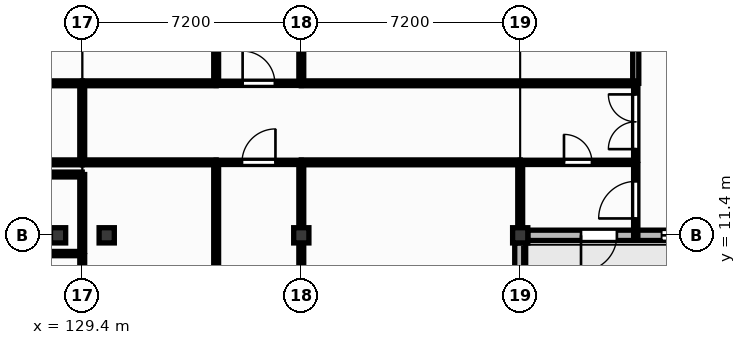
"""IFC4 building model, lengths in metres.
Left out: names, types, materials, properties, quantities, classifications, styles, units other than length and angle.
Written with IfcOpenShell. Run it as: python <this file> out.ifc"""

import sys

from ifc_helpers import new_model, si_unit, direction, frame, frame_2d, origin, origin_2d, place, context, subcontext, project, spatial, rectangle, extrude, element, fill, save


model = new_model("IFC4")
c1 = context("Model", 3, precision=1e-05, world=origin(), true_north=direction((0.0, 1.0)))
c2 = subcontext(c1, "Body", "Model", "MODEL_VIEW")
j1 = project(units=[si_unit("LENGTHUNIT", "METRE"), si_unit("PLANEANGLEUNIT", "RADIAN")], contexts=[c1])
p1 = place(None, origin())
s1 = spatial("IfcSite", under=j1, at=p1, CompositionType="ELEMENT")
p2 = place(p1, origin())
s2 = spatial("IfcBuilding", under=s1, at=p2, CompositionType="ELEMENT")
p3 = place(p2, frame((0.0, 0.0, 4.5)))
s3 = spatial("IfcBuildingStorey", under=s2, at=p3, CompositionType="ELEMENT", Elevation=4.5)
for number, where, z_axis, x_axis in (
    (1, (128.6, 11.4, 0.0), (0.0, 0.0, 1.0), (1.0, 0.0, 0.0)),
    (2, (130.2, 11.4, 0.0), (0.0, 0.0, 1.0), (1.0, 0.0, 0.0)),
    (3, (136.6, 11.4, 0.0), (0.0, 0.0, 1.0), (1.0, 0.0, 0.0)),
    (4, (143.8, 11.4, 0.0), (0.0, 0.0, 1.0), (1.0, 0.0, 0.0)),
):
    element("IfcColumn", number, at=place(p3, frame(where, z_axis=z_axis, x_axis=x_axis)), inside=s3, PredefinedType="COLUMN", context=c2, shape_type="SweptSolid", body=[
        extrude(rectangle(XDim=0.5, YDim=0.5, at=origin_2d()), origin(), (0.0, 0.0, 1.0), 4.22),
    ])
p4 = place(p3, frame((143.8, 4.45, 0.0), z_axis=(0.0, 0.0, 1.0), x_axis=(0.0, 1.0, 0.0)))
e5 = element("IfcWall", 5, at=p4, inside=s3, PredefinedType="SOLIDWALL", context=c2, shape_type="SweptSolid", body=[
    extrude(rectangle(XDim=6.7, YDim=0.36, at=frame_2d((3.35, 0.0))), origin(), (0.0, 0.0, 1.0), 3.52),
])
p5 = place(p4, frame((0.665, 0.0, 1.05)))
e6 = element("IfcOpeningElement", 6, at=p5, cuts=e5, PredefinedType="OPENING", context=c2, shape_type="SweptSolid", body=[
    extrude(rectangle(XDim=1.54, YDim=1.65, at=frame_2d((0.77, 0.825))), frame((0.0, 0.19, 0.0), z_axis=(0.0, -1.0, 0.0), x_axis=(1.0, 0.0, 0.0)), (0.0, 0.0, 1.0), 0.38),
])
p6 = place(p4, frame((3.475, 0.0, 1.5)))
e7 = element("IfcOpeningElement", 7, at=p6, cuts=e5, PredefinedType="OPENING", context=c2, shape_type="SweptSolid", body=[
    extrude(rectangle(XDim=1.15, YDim=1.25, at=frame_2d((0.575, 0.625))), frame((0.0, 0.19, 0.0), z_axis=(0.0, -1.0, 0.0), x_axis=(1.0, 0.0, 0.0)), (0.0, 0.0, 1.0), 0.38),
])
p7 = place(p3, frame((144.05, 11.4, 0.0), z_axis=(0.0, 0.0, 1.0), x_axis=(1.0, 0.0, 0.0)))
e8 = element("IfcWall", 8, at=p7, inside=s3, PredefinedType="SOLIDWALL", context=c2, shape_type="SweptSolid", body=[
    extrude(rectangle(XDim=6.77, YDim=0.34, at=frame_2d((3.385, 0.0))), origin(), (0.0, 0.0, 1.0), 3.76),
])
p8 = place(p7, frame((1.75, 0.0, 0.0)))
e9 = element("IfcOpeningElement", 9, at=p8, cuts=e8, PredefinedType="OPENING", context=c2, shape_type="SweptSolid", body=[
    extrude(rectangle(XDim=1.18, YDim=2.2, at=frame_2d((0.59, 1.1))), frame((0.0, 0.18, 0.0), z_axis=(0.0, -1.0, 0.0), x_axis=(1.0, 0.0, 0.0)), (0.0, 0.0, 1.0), 0.36),
])
p9 = place(p7, frame((4.4, 0.0, 1.05)))
e10 = element("IfcOpeningElement", 10, at=p9, cuts=e8, PredefinedType="OPENING", context=c2, shape_type="SweptSolid", body=[
    extrude(rectangle(XDim=1.4, YDim=1.65, at=frame_2d((0.7, 0.825))), frame((0.0, 0.18, 0.0), z_axis=(0.0, -1.0, 0.0), x_axis=(1.0, 0.0, 0.0)), (0.0, 0.0, 1.0), 0.36),
])
p10 = place(p3, frame((124.6, 10.8, 0.0), z_axis=(0.0, 0.0, 1.0), x_axis=(1.0, 0.0, 0.0)))
e11 = element("IfcWall", 11, at=p10, inside=s3, PredefinedType="PARTITIONING", context=c2, shape_type="SweptSolid", body=[
    extrude(rectangle(XDim=4.795, YDim=0.14, at=frame_2d((2.397, 0.0))), origin(), (0.0, 0.0, 1.0), 4.18),
])
p11 = place(p3, frame((133.8, 13.8, 0.0), z_axis=(0.0, 0.0, 1.0), x_axis=(1.0, 0.0, 0.0)))
e12 = element("IfcWall", 12, at=p11, inside=s3, PredefinedType="PARTITIONING", context=c2, shape_type="SweptSolid", body=[
    extrude(rectangle(XDim=2.8, YDim=0.14, at=frame_2d((1.4, 0.0))), origin(), (0.0, 0.0, 1.0), 4.18),
])
p12 = place(p11, frame((0.85, 0.0, 0.0)))
e13 = element("IfcOpeningElement", 13, at=p12, cuts=e12, PredefinedType="OPENING", context=c2, shape_type="SweptSolid", body=[
    extrude(rectangle(XDim=1.1, YDim=2.1, at=frame_2d((0.55, 1.05))), frame((0.0, 0.08, 0.0), z_axis=(0.0, -1.0, 0.0), x_axis=(1.0, 0.0, 0.0)), (0.0, 0.0, 1.0), 0.16),
])
p13 = place(p3, frame((133.8, 16.4, 0.0), z_axis=(0.0, 0.0, 1.0), x_axis=(1.0, 0.0, 0.0)))
e14 = element("IfcWall", 14, at=p13, inside=s3, PredefinedType="PARTITIONING", context=c2, shape_type="SweptSolid", body=[
    extrude(rectangle(XDim=2.8, YDim=0.14, at=frame_2d((1.4, 0.0))), origin(), (0.0, 0.0, 1.0), 4.18),
])
p14 = place(p13, frame((0.87, 0.0, 0.0)))
e15 = element("IfcOpeningElement", 15, at=p14, cuts=e14, PredefinedType="OPENING", context=c2, shape_type="SweptSolid", body=[
    extrude(rectangle(XDim=1.06, YDim=2.15, at=frame_2d((0.53, 1.075))), frame((0.0, 0.08, 0.0), z_axis=(0.0, -1.0, 0.0), x_axis=(1.0, 0.0, 0.0)), (0.0, 0.0, 1.0), 0.16),
])
p15 = place(p3, frame((143.8, 13.8, 0.0), z_axis=(0.0, 0.0, 1.0), x_axis=(1.0, 0.0, 0.0)))
e16 = element("IfcWall", 16, at=p15, inside=s3, PredefinedType="PARTITIONING", context=c2, shape_type="SweptSolid", body=[
    extrude(rectangle(XDim=3.8, YDim=0.14, at=frame_2d((1.9, 0.0))), origin(), (0.0, 0.0, 1.0), 4.18),
])
p16 = place(p15, frame((1.44, 0.0, 0.0)))
e17 = element("IfcOpeningElement", 17, at=p16, cuts=e16, PredefinedType="OPENING", context=c2, shape_type="SweptSolid", body=[
    extrude(rectangle(XDim=0.92, YDim=2.1, at=frame_2d((0.46, 1.05))), frame((0.0, 0.08, 0.0), z_axis=(0.0, -1.0, 0.0), x_axis=(1.0, 0.0, 0.0)), (0.0, 0.0, 1.0), 0.16),
])
p17 = place(p3, frame((147.6, 11.4, 0.0), z_axis=(0.0, 0.0, 1.0), x_axis=(0.0, 1.0, 0.0)))
e18 = element("IfcWall", 18, at=p17, inside=s3, PredefinedType="PARTITIONING", context=c2, shape_type="SweptSolid", body=[
    extrude(rectangle(XDim=2.33, YDim=0.14, at=frame_2d((1.165, 0.0))), origin(), (0.0, 0.0, 1.0), 4.18),
])
p18 = place(p17, frame((0.555, 0.0, 0.0)))
e19 = element("IfcOpeningElement", 19, at=p18, cuts=e18, PredefinedType="OPENING", context=c2, shape_type="SweptSolid", body=[
    extrude(rectangle(XDim=1.22, YDim=2.1, at=frame_2d((0.61, 1.05))), frame((0.0, 0.08, 0.0), z_axis=(0.0, -1.0, 0.0), x_axis=(1.0, 0.0, 0.0)), (0.0, 0.0, 1.0), 0.16),
])
p19 = place(p3, frame((147.6, 13.87, 0.0), z_axis=(0.0, 0.0, 1.0), x_axis=(0.0, 1.0, 0.0)))
e20 = element("IfcWall", 20, at=p19, inside=s3, PredefinedType="PARTITIONING", context=c2, shape_type="SweptSolid", body=[
    extrude(rectangle(XDim=2.53, YDim=0.14, at=frame_2d((1.265, 0.0))), origin(), (0.0, 0.0, 1.0), 4.18),
])
p20 = place(p19, frame((0.365, 0.0, 0.0)))
e21 = element("IfcOpeningElement", 21, at=p20, cuts=e20, PredefinedType="OPENING", context=c2, shape_type="SweptSolid", body=[
    extrude(rectangle(XDim=1.8, YDim=2.3, at=frame_2d((0.9, 1.15))), frame((0.0, 0.08, 0.0), z_axis=(0.0, -1.0, 0.0), x_axis=(1.0, 0.0, 0.0)), (0.0, 0.0, 1.0), 0.16),
])
p21 = place(p3, frame((147.6, 16.4, 0.0), z_axis=(0.0, 0.0, 1.0), x_axis=(0.0, 1.0, 0.0)))
e22 = element("IfcWall", 22, at=p21, inside=s3, PredefinedType="PARTITIONING", context=c2, shape_type="SweptSolid", body=[
    extrude(rectangle(XDim=2.2, YDim=0.2, at=frame_2d((1.1, 0.0))), origin(), (0.0, 0.0, 1.0), 4.18),
])
p22 = place(p3, frame((129.395, 10.87, 0.0), z_axis=(0.0, 0.0, 1.0), x_axis=(0.0, 1.0, 0.0)))
e23 = element("IfcWall", 23, at=p22, inside=s3, PredefinedType="PARTITIONING", context=c2, shape_type="SweptSolid", body=[
    extrude(rectangle(XDim=2.53, YDim=0.16, at=frame_2d((1.265, 0.0))), origin(), (0.0, 0.0, 1.0), 4.18),
])
for number, where, z_axis, x_axis in (
    (24, (129.395, 13.4, 0.0), (0.0, 0.0, 1.0), (-1.0, 0.0, 0.0)),
    (25, (124.6, 13.8, 0.0), (0.0, 0.0, 1.0), (1.0, 0.0, 0.0)),
):
    element("IfcWall", number, at=place(p3, frame(where, z_axis=z_axis, x_axis=x_axis)), inside=s3, PredefinedType="PARTITIONING", context=c2, shape_type="SweptSolid", body=[
        extrude(rectangle(XDim=4.795, YDim=0.16, at=frame_2d((2.397, 0.0))), origin(), (0.0, 0.0, 1.0), 4.18),
    ])
p23 = place(p3, frame((129.395, 13.8, 0.0), z_axis=(0.0, 0.0, 1.0), x_axis=(0.0, 1.0, 0.0)))
e26 = element("IfcWall", 26, at=p23, inside=s3, PredefinedType="PARTITIONING", context=c2, shape_type="SweptSolid", body=[
    extrude(rectangle(XDim=2.6, YDim=0.16, at=frame_2d((1.3, 0.0))), origin(), (0.0, 0.0, 1.0), 4.18),
])
p24 = place(p3, frame((129.395, 16.4, 0.0), z_axis=(0.0, 0.0, 1.0), x_axis=(-1.0, 0.0, 0.0)))
e27 = element("IfcWall", 27, at=p24, inside=s3, PredefinedType="PARTITIONING", context=c2, shape_type="SweptSolid", body=[
    extrude(rectangle(XDim=4.795, YDim=0.16, at=frame_2d((2.397, 0.0))), origin(), (0.0, 0.0, 1.0), 4.18),
])
p25 = place(p3, frame((129.405, 13.8, 0.0), z_axis=(0.0, 0.0, 1.0), x_axis=(1.0, 0.0, 0.0)))
e28 = element("IfcWall", 28, at=p25, inside=s3, PredefinedType="PARTITIONING", context=c2, shape_type="SweptSolid", body=[
    extrude(rectangle(XDim=4.395, YDim=0.16, at=frame_2d((2.198, 0.0))), origin(), (0.0, 0.0, 1.0), 4.18),
])
p26 = place(p3, frame((136.6, 13.8, 0.0), z_axis=(0.0, 0.0, 1.0), x_axis=(1.0, 0.0, 0.0)))
e29 = element("IfcWall", 29, at=p26, inside=s3, PredefinedType="PARTITIONING", context=c2, shape_type="SweptSolid", body=[
    extrude(rectangle(XDim=7.2, YDim=0.16, at=frame_2d((3.6, 0.0))), origin(), (0.0, 0.0, 1.0), 4.18),
])
p27 = place(p3, frame((147.6, 16.4, 0.0), z_axis=(0.0, 0.0, 1.0), x_axis=(-1.0, 0.0, 0.0)))
e30 = element("IfcWall", 30, at=p27, inside=s3, PredefinedType="PARTITIONING", context=c2, shape_type="SweptSolid", body=[
    extrude(rectangle(XDim=11.0, YDim=0.16, at=frame_2d((5.5, 0.0))), origin(), (0.0, 0.0, 1.0), 4.18),
])
p28 = place(p3, frame((133.8, 16.4, 0.0), z_axis=(0.0, 0.0, 1.0), x_axis=(-1.0, 0.0, 0.0)))
e31 = element("IfcWall", 31, at=p28, inside=s3, PredefinedType="PARTITIONING", context=c2, shape_type="SweptSolid", body=[
    extrude(rectangle(XDim=4.395, YDim=0.16, at=frame_2d((2.198, 0.0))), origin(), (0.0, 0.0, 1.0), 4.18),
])
p29 = place(p3, frame((143.8, 11.65, 0.0), z_axis=(0.0, 0.0, 1.0), x_axis=(0.0, 1.0, 0.0)))
e32 = element("IfcWall", 32, at=p29, inside=s3, PredefinedType="PARTITIONING", context=c2, shape_type="SweptSolid", body=[
    extrude(rectangle(XDim=2.08, YDim=0.16, at=frame_2d((1.04, 0.0))), origin(), (0.0, 0.0, 1.0), 3.52),
])
p30 = place(p3, frame((136.6, 9.8, 0.0), z_axis=(0.0, 0.0, 1.0), x_axis=(0.0, 1.0, 0.0)))
e33 = element("IfcWall", 33, at=p30, inside=s3, PredefinedType="PARTITIONING", context=c2, shape_type="SweptSolid", body=[
    extrude(rectangle(XDim=1.35, YDim=0.16, at=frame_2d((0.675, 0.0))), origin(), (0.0, 0.0, 1.0), 3.52),
])
p31 = place(p3, frame((136.6, 11.65, 0.0), z_axis=(0.0, 0.0, 1.0), x_axis=(0.0, 1.0, 0.0)))
e34 = element("IfcWall", 34, at=p31, inside=s3, PredefinedType="PARTITIONING", context=c2, shape_type="SweptSolid", body=[
    extrude(rectangle(XDim=2.08, YDim=0.16, at=frame_2d((1.04, 0.0))), origin(), (0.0, 0.0, 1.0), 3.52),
])
p32 = place(p3, frame((133.8, 9.8, 0.0), z_axis=(0.0, 0.0, 1.0), x_axis=(0.0, 1.0, 0.0)))
e35 = element("IfcWall", 35, at=p32, inside=s3, PredefinedType="PARTITIONING", context=c2, shape_type="SweptSolid", body=[
    extrude(rectangle(XDim=3.93, YDim=0.16, at=frame_2d((1.965, 0.0))), origin(), (0.0, 0.0, 1.0), 4.18),
])
p33 = place(p3, frame((136.6, 16.47, 0.0), z_axis=(0.0, 0.0, 1.0), x_axis=(0.0, 1.0, 0.0)))
e36 = element("IfcWall", 36, at=p33, inside=s3, PredefinedType="PARTITIONING", context=c2, shape_type="SweptSolid", body=[
    extrude(rectangle(XDim=1.88, YDim=0.16, at=frame_2d((0.94, 0.0))), origin(), (0.0, 0.0, 1.0), 3.52),
])
p34 = place(p3, frame((133.8, 16.47, 0.0), z_axis=(0.0, 0.0, 1.0), x_axis=(0.0, 1.0, 0.0)))
e37 = element("IfcWall", 37, at=p34, inside=s3, PredefinedType="PARTITIONING", context=c2, shape_type="SweptSolid", body=[
    extrude(rectangle(XDim=2.13, YDim=0.16, at=frame_2d((1.065, 0.0))), origin(), (0.0, 0.0, 1.0), 4.18),
])
p35 = place(p3, frame((129.395, 9.8, 0.0), z_axis=(0.0, 0.0, 1.0), x_axis=(0.0, 1.0, 0.0)))
e38 = element("IfcWall", 38, at=p35, inside=s3, PredefinedType="PARTITIONING", context=c2, shape_type="SweptSolid", body=[
    extrude(rectangle(XDim=0.93, YDim=0.16, at=frame_2d((0.465, 0.0))), origin(), (0.0, 0.0, 1.0), 4.18),
])
p36 = place(p8, frame((1.18, 0.0, 0.0), z_axis=(0.0, 0.0, 1.0), x_axis=(-1.0, 0.0, 0.0)))
e39 = element("IfcDoor", 39, at=p36, inside=s3, OperationType="SINGLE_SWING_RIGHT", PredefinedType="DOOR", context=c2, shape_type="SweptSolid", body=[
    extrude(rectangle(XDim=1.18, YDim=2.2, at=frame_2d((0.59, 1.1))), frame((0.0, 0.025, 0.0), z_axis=(0.0, -1.0, 0.0), x_axis=(1.0, 0.0, 0.0)), (0.0, 0.0, 1.0), 0.05),
])
fill(e9, e39)
p37 = place(p9, origin())
e40 = element("IfcWindow", 40, at=p37, inside=s3, PartitioningType="SINGLE_PANEL", PredefinedType="WINDOW", context=c2, shape_type="SweptSolid", body=[
    extrude(rectangle(XDim=1.4, YDim=1.65, at=frame_2d((0.7, 0.825))), frame((0.0, 0.03, 0.0), z_axis=(0.0, -1.0, 0.0), x_axis=(1.0, 0.0, 0.0)), (0.0, 0.0, 1.0), 0.06),
])
fill(e10, e40)
p38 = place(p20, origin())
e41 = element("IfcDoor", 41, at=p38, inside=s3, OperationType="DOUBLE_DOOR_SINGLE_SWING", PredefinedType="DOOR", context=c2, shape_type="SweptSolid", body=[
    extrude(rectangle(XDim=1.8, YDim=2.3, at=frame_2d((0.9, 1.15))), frame((0.0, 0.025, 0.0), z_axis=(0.0, -1.0, 0.0), x_axis=(1.0, 0.0, 0.0)), (0.0, 0.0, 1.0), 0.05),
])
fill(e21, e41)
p39 = place(p18, origin())
e42 = element("IfcDoor", 42, at=p39, inside=s3, OperationType="SINGLE_SWING_LEFT", PredefinedType="DOOR", context=c2, shape_type="SweptSolid", body=[
    extrude(rectangle(XDim=1.22, YDim=2.1, at=frame_2d((0.61, 1.05))), frame((0.0, 0.025, 0.0), z_axis=(0.0, -1.0, 0.0), x_axis=(1.0, 0.0, 0.0)), (0.0, 0.0, 1.0), 0.05),
])
fill(e19, e42)
p40 = place(p16, origin())
e43 = element("IfcDoor", 43, at=p40, inside=s3, OperationType="SINGLE_SWING_LEFT", PredefinedType="DOOR", context=c2, shape_type="SweptSolid", body=[
    extrude(rectangle(XDim=0.92, YDim=2.1, at=frame_2d((0.46, 1.05))), frame((0.0, 0.025, 0.0), z_axis=(0.0, -1.0, 0.0), x_axis=(1.0, 0.0, 0.0)), (0.0, 0.0, 1.0), 0.05),
])
fill(e17, e43)
p41 = place(p12, origin())
e44 = element("IfcDoor", 44, at=p41, inside=s3, OperationType="SINGLE_SWING_RIGHT", PredefinedType="DOOR", context=c2, shape_type="SweptSolid", body=[
    extrude(rectangle(XDim=1.1, YDim=2.1, at=frame_2d((0.55, 1.05))), frame((0.0, 0.025, 0.0), z_axis=(0.0, -1.0, 0.0), x_axis=(1.0, 0.0, 0.0)), (0.0, 0.0, 1.0), 0.05),
])
fill(e13, e44)
p42 = place(p14, origin())
e45 = element("IfcDoor", 45, at=p42, inside=s3, OperationType="SINGLE_SWING_LEFT", PredefinedType="DOOR", context=c2, shape_type="SweptSolid", body=[
    extrude(rectangle(XDim=1.06, YDim=2.15, at=frame_2d((0.53, 1.075))), frame((0.0, 0.025, 0.0), z_axis=(0.0, -1.0, 0.0), x_axis=(1.0, 0.0, 0.0)), (0.0, 0.0, 1.0), 0.05),
])
fill(e15, e45)
save(model, sys.argv[1])
